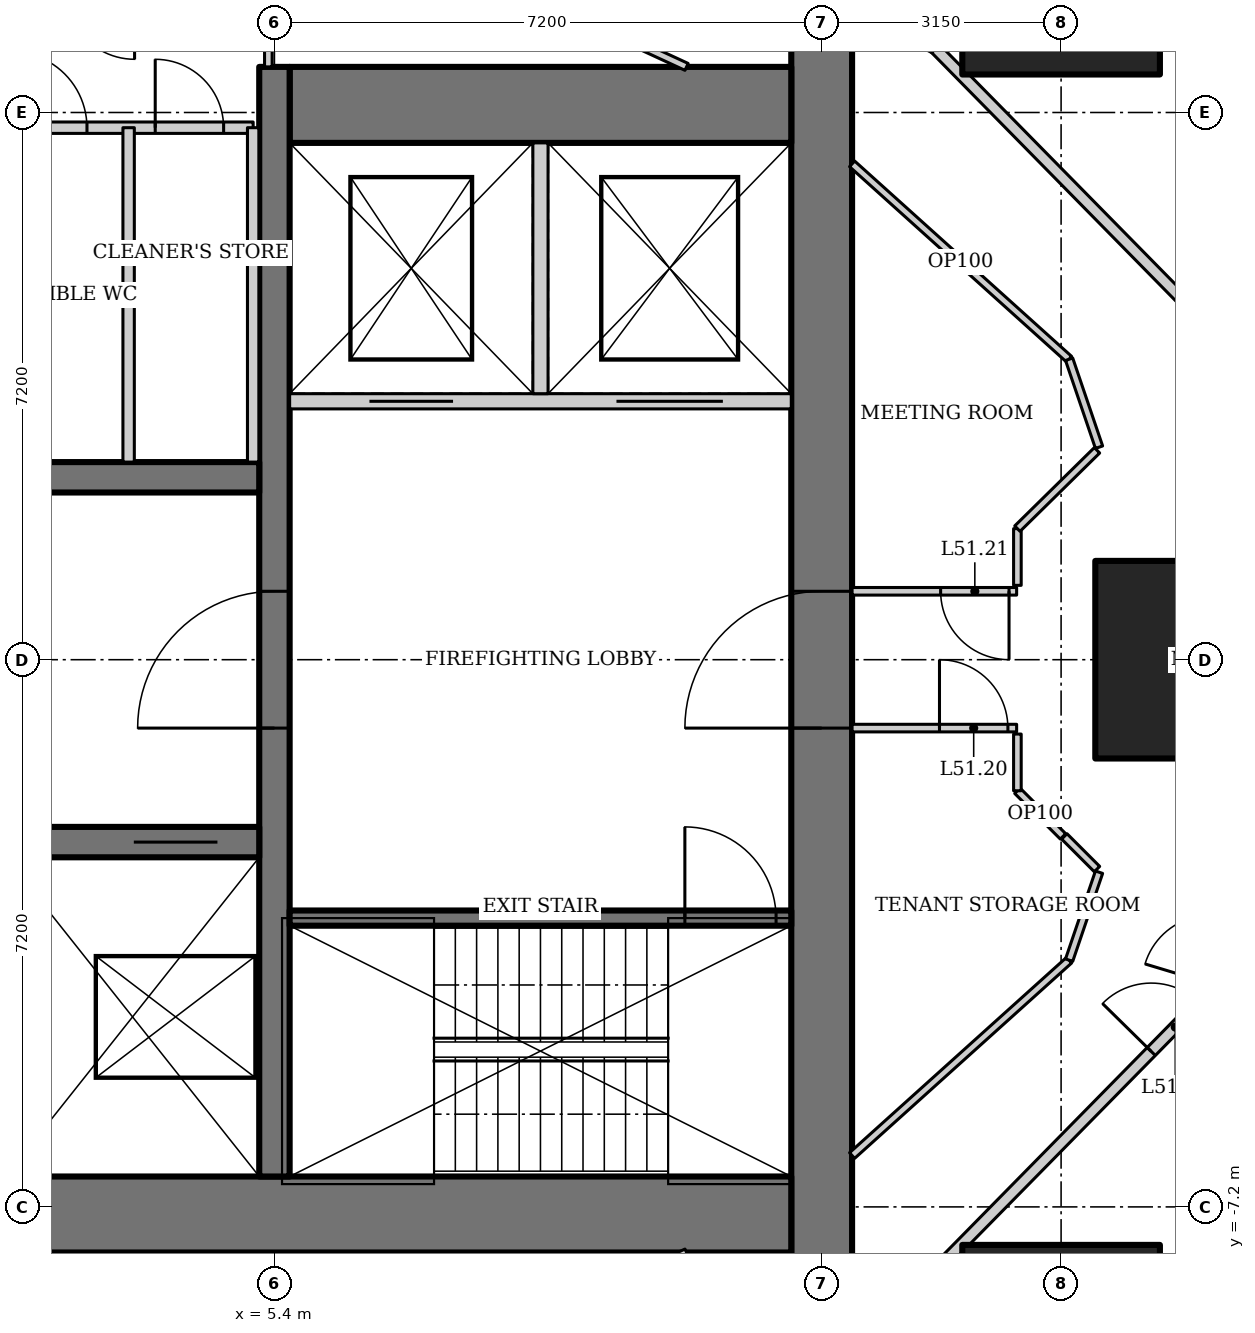
"""IFC4 building model, lengths in metres.
Left out: names, types, materials, properties, quantities, classifications, styles, units other than length and angle.
Written with IfcOpenShell. Run it as: python <this file> out.ifc"""

import sys

from ifc_helpers import new_model, si_unit, direction, frame, frame_2d, origin, origin_2d, place, context, subcontext, project, spatial, rectangle, hollow_rectangle, extrude, element, fill, save


model = new_model("IFC4")
c1 = context("Model", 3, precision=1e-05, world=origin(), true_north=direction((0.0, 1.0)))
c2 = subcontext(c1, "Body", "Model", "MODEL_VIEW")
j1 = project(units=[si_unit("LENGTHUNIT", "METRE"), si_unit("PLANEANGLEUNIT", "RADIAN")], contexts=[c1])
p1 = place(None, origin())
s1 = spatial("IfcSite", under=j1, at=p1, CompositionType="ELEMENT")
p2 = place(p1, origin())
s2 = spatial("IfcBuilding", under=s1, at=p2, CompositionType="ELEMENT")
p3 = place(p2, frame((0.0, 0.0, 220.0)))
s3 = spatial("IfcBuildingStorey", under=s2, at=p3, CompositionType="ELEMENT", Elevation=220.0)
for number, where, z_axis, x_axis in (
    (1, (17.5, 0.0, 0.0), (0.0, 0.0, 1.0), (1.0, 0.0, 0.0)),
    (2, (15.75, 9.0, 0.0), (0.0, 0.0, 1.0), (1.0, 0.0, 0.0)),
    (3, (15.75, -9.0, 0.0), (0.0, 0.0, 1.0), (1.0, 0.0, 0.0)),
):
    element("IfcColumn", number, at=place(p3, frame(where, z_axis=z_axis, x_axis=x_axis)), inside=s3, PredefinedType="COLUMN", context=c2, shape_type="SweptSolid", body=[
        extrude(hollow_rectangle(XDim=2.6, YDim=2.6, WallThickness=0.13, at=origin_2d()), origin(), (0.0, 0.0, 1.0), 4.2),
    ])
p4 = place(p3, frame((12.6, -13.0, 0.0), z_axis=(0.0, 0.0, 1.0), x_axis=(0.0, 1.0, 0.0)))
e4 = element("IfcWall", 4, at=p4, inside=s3, PredefinedType="SHEAR", context=c2, shape_type="SweptSolid", body=[
    extrude(rectangle(XDim=26.0, YDim=0.8, at=frame_2d((13.0, 0.0))), origin(), (0.0, 0.0, 1.0), 4.2),
])
p5 = place(p4, frame((12.1, 0.0, 0.0)))
e5 = element("IfcOpeningElement", 5, at=p5, cuts=e4, PredefinedType="OPENING", context=c2, shape_type="SweptSolid", body=[
    extrude(rectangle(XDim=1.8, YDim=2.1, at=frame_2d((0.9, 1.05))), frame((0.0, 0.41, 0.0), z_axis=(0.0, -1.0, 0.0), x_axis=(1.0, 0.0, 0.0)), (0.0, 0.0, 1.0), 0.82),
])
p6 = place(p3, frame((-12.2, -7.3, 0.0), z_axis=(0.0, 0.0, 1.0), x_axis=(1.0, 0.0, 0.0)))
e6 = element("IfcWall", 6, at=p6, inside=s3, PredefinedType="SHEAR", context=c2, shape_type="SweptSolid", body=[
    extrude(rectangle(XDim=24.4, YDim=1.0, at=frame_2d((12.2, 0.0))), origin(), (0.0, 0.0, 1.0), 4.2),
])
p7 = place(p3, frame((12.2, 7.3, 0.0), z_axis=(0.0, 0.0, 1.0), x_axis=(-1.0, 0.0, 0.0)))
e7 = element("IfcWall", 7, at=p7, inside=s3, PredefinedType="SHEAR", context=c2, shape_type="SweptSolid", body=[
    extrude(rectangle(XDim=6.6, YDim=1.0, at=frame_2d((3.3, 0.0))), origin(), (0.0, 0.0, 1.0), 4.2),
])
p8 = place(p3, frame((5.4, -6.8, 0.0), z_axis=(0.0, 0.0, 1.0), x_axis=(0.0, 1.0, 0.0)))
e8 = element("IfcWall", 8, at=p8, inside=s3, PredefinedType="SHEAR", context=c2, shape_type="SweptSolid", body=[
    extrude(rectangle(XDim=14.6, YDim=0.4, at=frame_2d((7.3, 0.0))), origin(), (0.0, 0.0, 1.0), 4.2),
])
p9 = place(p8, frame((5.9, 0.0, 0.0)))
e9 = element("IfcOpeningElement", 9, at=p9, cuts=e8, PredefinedType="OPENING", context=c2, shape_type="SweptSolid", body=[
    extrude(rectangle(XDim=1.8, YDim=2.1, at=frame_2d((0.9, 1.05))), frame((0.0, 0.21, 0.0), z_axis=(0.0, -1.0, 0.0), x_axis=(1.0, 0.0, 0.0)), (0.0, 0.0, 1.0), 0.42),
])
p10 = place(p3, frame((-5.2, -2.4, 0.0), z_axis=(0.0, 0.0, 1.0), x_axis=(1.0, 0.0, 0.0)))
e10 = element("IfcWall", 10, at=p10, inside=s3, PredefinedType="SHEAR", context=c2, shape_type="SweptSolid", body=[
    extrude(rectangle(XDim=10.4, YDim=0.4, at=frame_2d((5.2, 0.0))), origin(), (0.0, 0.0, 1.0), 4.2),
])
p11 = place(p10, frame((1.683, 0.0, 0.0)))
e11 = element("IfcOpeningElement", 11, at=p11, cuts=e10, PredefinedType="OPENING", context=c2, shape_type="SweptSolid", body=[
    extrude(rectangle(XDim=1.1, YDim=2.2, at=frame_2d((0.55, 1.1))), frame((0.0, 0.21, 0.0), z_axis=(0.0, -1.0, 0.0), x_axis=(1.0, 0.0, 0.0)), (0.0, 0.0, 1.0), 0.42),
])
p12 = place(p10, frame((5.217, 0.0, 0.0)))
e12 = element("IfcOpeningElement", 12, at=p12, cuts=e10, PredefinedType="OPENING", context=c2, shape_type="SweptSolid", body=[
    extrude(rectangle(XDim=1.1, YDim=2.2, at=frame_2d((0.55, 1.1))), frame((0.0, 0.21, 0.0), z_axis=(0.0, -1.0, 0.0), x_axis=(1.0, 0.0, 0.0)), (0.0, 0.0, 1.0), 0.42),
])
p13 = place(p10, frame((8.75, 0.0, 0.0)))
e13 = element("IfcOpeningElement", 13, at=p13, cuts=e10, PredefinedType="OPENING", context=c2, shape_type="SweptSolid", body=[
    extrude(rectangle(XDim=1.1, YDim=2.2, at=frame_2d((0.55, 1.1))), frame((0.0, 0.21, 0.0), z_axis=(0.0, -1.0, 0.0), x_axis=(1.0, 0.0, 0.0)), (0.0, 0.0, 1.0), 0.42),
])
p14 = place(p3, frame((5.2, 2.4, 0.0), z_axis=(0.0, 0.0, 1.0), x_axis=(-1.0, 0.0, 0.0)))
e14 = element("IfcWall", 14, at=p14, inside=s3, PredefinedType="SHEAR", context=c2, shape_type="SweptSolid", body=[
    extrude(rectangle(XDim=10.4, YDim=0.4, at=frame_2d((5.2, 0.0))), origin(), (0.0, 0.0, 1.0), 4.2),
])
p15 = place(p3, frame((5.6, -3.4, 0.0), z_axis=(0.0, 0.0, 1.0), x_axis=(1.0, 0.0, 0.0)))
e15 = element("IfcWall", 15, at=p15, inside=s3, PredefinedType="SHEAR", context=c2, shape_type="SweptSolid", body=[
    extrude(rectangle(XDim=6.6, YDim=0.2, at=frame_2d((3.3, 0.0))), origin(), (0.0, 0.0, 1.0), 4.2),
])
p16 = place(p15, frame((5.2, 0.0, 0.0)))
e16 = element("IfcOpeningElement", 16, at=p16, cuts=e15, PredefinedType="OPENING", context=c2, shape_type="SweptSolid", body=[
    extrude(rectangle(XDim=1.2, YDim=2.1, at=frame_2d((0.6, 1.05))), frame((0.0, 0.11, 0.0), z_axis=(0.0, -1.0, 0.0), x_axis=(1.0, 0.0, 0.0)), (0.0, 0.0, 1.0), 0.22),
])
p17 = place(p3, frame((12.2, 3.4, 0.0), z_axis=(0.0, 0.0, 1.0), x_axis=(-1.0, 0.0, 0.0)))
e17 = element("IfcWall", 17, at=p17, inside=s3, PredefinedType="SOLIDWALL", context=c2, shape_type="SweptSolid", body=[
    extrude(rectangle(XDim=6.6, YDim=0.2, at=frame_2d((3.3, 0.0))), origin(), (0.0, 0.0, 1.0), 4.2),
])
p18 = place(p17, frame((4.45, 0.0, 0.0)))
e18 = element("IfcOpeningElement", 18, at=p18, cuts=e17, PredefinedType="OPENING", context=c2, shape_type="SweptSolid", body=[
    extrude(rectangle(XDim=1.1, YDim=2.2, at=frame_2d((0.55, 1.1))), frame((0.0, 0.11, 0.0), z_axis=(0.0, -1.0, 0.0), x_axis=(1.0, 0.0, 0.0)), (0.0, 0.0, 1.0), 0.22),
])
p19 = place(p17, frame((0.9, 0.0, 0.0)))
e19 = element("IfcOpeningElement", 19, at=p19, cuts=e17, PredefinedType="OPENING", context=c2, shape_type="SweptSolid", body=[
    extrude(rectangle(XDim=1.4, YDim=2.2, at=frame_2d((0.7, 1.1))), frame((0.0, 0.11, 0.0), z_axis=(0.0, -1.0, 0.0), x_axis=(1.0, 0.0, 0.0)), (0.0, 0.0, 1.0), 0.22),
])
p20 = place(p3, frame((8.9, 3.5, 0.0), z_axis=(0.0, 0.0, 1.0), x_axis=(0.0, 1.0, 0.0)))
e20 = element("IfcWall", 20, at=p20, inside=s3, PredefinedType="SOLIDWALL", context=c2, shape_type="SweptSolid", body=[
    extrude(rectangle(XDim=3.3, YDim=0.2, at=frame_2d((1.65, 0.0))), origin(), (0.0, 0.0, 1.0), 4.2),
])
p21 = place(p3, frame((17.673, 4.406, 0.0), z_axis=(0.0, 0.0, 1.0), x_axis=(-0.701111216625, 0.713051934941, 0.0)))
e21 = element("IfcWall", 21, at=p21, inside=s3, PredefinedType="PARTITIONING", context=c2, shape_type="SweptSolid", body=[
    extrude(rectangle(XDim=5.112, YDim=0.15, at=frame_2d((2.556, 0.0))), origin(), (0.0, 0.0, 1.0), 4.05),
])
p22 = place(p3, frame((14.089, 8.051, 0.0), z_axis=(0.0, 0.0, 1.0), x_axis=(-0.886174439647, 0.463351769735, 0.0)))
e22 = element("IfcWall", 22, at=p22, inside=s3, PredefinedType="PARTITIONING", context=c2, shape_type="SweptSolid", body=[
    extrude(rectangle(XDim=4.735, YDim=0.15, at=frame_2d((2.367, 0.0))), origin(), (0.0, 0.0, 1.0), 4.05),
])
p23 = place(p3, frame((14.089, -8.051, 0.0), z_axis=(0.0, 0.0, 1.0), x_axis=(0.701111216625, 0.713051934941, 0.0)))
e23 = element("IfcWall", 23, at=p23, inside=s3, PredefinedType="PARTITIONING", context=c2, shape_type="SweptSolid", body=[
    extrude(rectangle(XDim=5.112, YDim=0.15, at=frame_2d((2.556, 0.0))), origin(), (0.0, 0.0, 1.0), 4.05),
])
p24 = place(p23, frame((4.061, 0.0, 0.0)))
e24 = element("IfcOpeningElement", 24, at=p24, cuts=e23, PredefinedType="OPENING", context=c2, shape_type="SweptSolid", body=[
    extrude(rectangle(XDim=0.9, YDim=2.1, at=frame_2d((0.45, 1.05))), frame((0.0, 0.085, 0.0), z_axis=(0.0, -1.0, 0.0), x_axis=(1.0, 0.0, 0.0)), (0.0, 0.0, 1.0), 0.17),
])
p25 = place(p3, frame((-5.12, 7.0, 0.0), z_axis=(0.0, 0.0, 1.0), x_axis=(1.0, 0.0, 0.0)))
e25 = element("IfcWall", 25, at=p25, inside=s3, PredefinedType="SOLIDWALL", context=c2, shape_type="SweptSolid", body=[
    extrude(rectangle(XDim=10.24, YDim=0.15, at=frame_2d((5.12, 0.0))), origin(), (0.0, 0.0, 1.0), 4.05),
])
p26 = place(p25, frame((1.2, 0.0, 0.0)))
e26 = element("IfcOpeningElement", 26, at=p26, cuts=e25, PredefinedType="OPENING", context=c2, shape_type="SweptSolid", body=[
    extrude(rectangle(XDim=0.9, YDim=2.1, at=frame_2d((0.45, 1.05))), frame((0.0, 0.085, 0.0), z_axis=(0.0, -1.0, 0.0), x_axis=(1.0, 0.0, 0.0)), (0.0, 0.0, 1.0), 0.17),
])
p27 = place(p25, frame((4.477, 0.0, 0.0)))
e27 = element("IfcOpeningElement", 27, at=p27, cuts=e25, PredefinedType="OPENING", context=c2, shape_type="SweptSolid", body=[
    extrude(rectangle(XDim=0.9, YDim=2.1, at=frame_2d((0.45, 1.05))), frame((0.0, 0.085, 0.0), z_axis=(0.0, -1.0, 0.0), x_axis=(1.0, 0.0, 0.0)), (0.0, 0.0, 1.0), 0.17),
])
p28 = place(p25, frame((7.054, 0.0, 0.0)))
e28 = element("IfcOpeningElement", 28, at=p28, cuts=e25, PredefinedType="OPENING", context=c2, shape_type="SweptSolid", body=[
    extrude(rectangle(XDim=1.0, YDim=2.1, at=frame_2d((0.5, 1.05))), frame((0.0, 0.085, 0.0), z_axis=(0.0, -1.0, 0.0), x_axis=(1.0, 0.0, 0.0)), (0.0, 0.0, 1.0), 0.17),
])
p29 = place(p25, frame((8.952, 0.0, 0.0)))
e29 = element("IfcOpeningElement", 29, at=p29, cuts=e25, PredefinedType="OPENING", context=c2, shape_type="SweptSolid", body=[
    extrude(rectangle(XDim=0.9, YDim=2.1, at=frame_2d((0.45, 1.05))), frame((0.0, 0.085, 0.0), z_axis=(0.0, -1.0, 0.0), x_axis=(1.0, 0.0, 0.0)), (0.0, 0.0, 1.0), 0.17),
])
for number, where, z_axis, x_axis in (
    (30, (5.12, 2.6, 0.0), (0.0, 0.0, 1.0), (0.0, 1.0, 0.0)),
    (31, (3.482, 2.6, 0.0), (0.0, 0.0, 1.0), (0.0, 1.0, 0.0)),
):
    element("IfcWall", number, at=place(p3, frame(where, z_axis=z_axis, x_axis=x_axis)), inside=s3, PredefinedType="SOLIDWALL", context=c2, shape_type="SweptSolid", body=[
        extrude(rectangle(XDim=4.4, YDim=0.15, at=frame_2d((2.2, 0.0))), origin(), (0.0, 0.0, 1.0), 4.05),
    ])
p30 = place(p3, frame((10.823, -7.8, 0.0), z_axis=(0.0, 0.0, 1.0), x_axis=(-0.907759689292, -0.419490579748, 0.0)))
e32 = element("IfcWall", 32, at=p30, inside=s3, PredefinedType="PARTITIONING", context=c2, shape_type="SweptSolid", body=[
    extrude(rectangle(XDim=2.506, YDim=0.1, at=frame_2d((1.253, 0.0))), origin(), (0.0, 0.0, 1.0), 4.05),
])
for number, where, z_axis, x_axis in (
    (33, (15.856, -3.953, 0.0), (0.0, 0.0, 1.0), (-0.743, -0.669, 0.0)),
    (34, (13.0, 6.524, 0.0), (0.0, 0.0, 1.0), (0.743, -0.669, 0.0)),
):
    element("IfcWall", number, at=place(p3, frame(where, z_axis=z_axis, x_axis=x_axis)), inside=s3, PredefinedType="PARTITIONING", context=c2, shape_type="SweptSolid", body=[
        extrude(rectangle(XDim=3.843, YDim=0.1, at=frame_2d((1.921, 0.0))), origin(), (0.0, 0.0, 1.0), 4.05),
    ])
p31 = place(p3, frame((5.32, 7.8, 0.0), z_axis=(0.0, 0.0, 1.0), x_axis=(0.0, 1.0, 0.0)))
e35 = element("IfcWall", 35, at=p31, inside=s3, PredefinedType="PARTITIONING", context=c2, shape_type="SweptSolid", body=[
    extrude(rectangle(XDim=1.0, YDim=0.1, at=frame_2d((0.5, 0.0))), origin(), (0.0, 0.0, 1.0), 4.05),
])
p32 = place(p3, frame((8.548, 8.851, 0.0), z_axis=(0.0, 0.0, 1.0), x_axis=(0.907759689292, -0.419490579748, 0.0)))
e36 = element("IfcWall", 36, at=p32, inside=s3, PredefinedType="PARTITIONING", context=c2, shape_type="SweptSolid", body=[
    extrude(rectangle(XDim=2.506, YDim=0.1, at=frame_2d((1.253, 0.0))), origin(), (0.0, 0.0, 1.0), 4.05),
])
p33 = place(p3, frame((13.0, -0.9, 0.0), z_axis=(0.0, 0.0, 1.0), x_axis=(1.0, 0.0, 0.0)))
e37 = element("IfcWall", 37, at=p33, inside=s3, PredefinedType="PARTITIONING", context=c2, shape_type="SweptSolid", body=[
    extrude(rectangle(XDim=2.165, YDim=0.1, at=frame_2d((1.083, 0.0))), origin(), (0.0, 0.0, 1.0), 4.05),
])
p34 = place(p33, frame((1.15, 0.0, 0.0)))
e38 = element("IfcOpeningElement", 38, at=p34, cuts=e37, PredefinedType="OPENING", context=c2, shape_type="SweptSolid", body=[
    extrude(rectangle(XDim=0.9, YDim=2.1, at=frame_2d((0.45, 1.05))), frame((0.0, 0.06, 0.0), z_axis=(0.0, -1.0, 0.0), x_axis=(1.0, 0.0, 0.0)), (0.0, 0.0, 1.0), 0.12),
])
for number, where, z_axis, x_axis in (
    (39, (16.249, -2.796, 0.0), (0.0, 0.0, 1.0), (-0.322, -0.947, 0.0)),
    (40, (15.856, 3.953, 0.0), (0.0, 0.0, 1.0), (0.322, -0.947, 0.0)),
):
    element("IfcWall", number, at=place(p3, frame(where, z_axis=z_axis, x_axis=x_axis)), inside=s3, PredefinedType="PARTITIONING", context=c2, shape_type="SweptSolid", body=[
        extrude(rectangle(XDim=1.223, YDim=0.1, at=frame_2d((0.611, 0.0))), origin(), (0.0, 0.0, 1.0), 4.05),
    ])
p35 = place(p3, frame((15.165, 0.9, 0.0), z_axis=(0.0, 0.0, 1.0), x_axis=(-1.0, 0.0, 0.0)))
e41 = element("IfcWall", 41, at=p35, inside=s3, PredefinedType="PARTITIONING", context=c2, shape_type="SweptSolid", body=[
    extrude(rectangle(XDim=2.165, YDim=0.1, at=frame_2d((1.083, 0.0))), origin(), (0.0, 0.0, 1.0), 4.05),
])
p36 = place(p35, frame((0.1, 0.0, 0.0)))
e42 = element("IfcOpeningElement", 42, at=p36, cuts=e41, PredefinedType="OPENING", context=c2, shape_type="SweptSolid", body=[
    extrude(rectangle(XDim=0.9, YDim=2.1, at=frame_2d((0.45, 1.05))), frame((0.0, 0.06, 0.0), z_axis=(0.0, -1.0, 0.0), x_axis=(1.0, 0.0, 0.0)), (0.0, 0.0, 1.0), 0.12),
])
p37 = place(p3, frame((15.775, -2.325, 0.0), z_axis=(0.0, 0.0, 1.0), x_axis=(-0.707106781187, 0.707106781187, 0.0)))
e43 = element("IfcWall", 43, at=p37, inside=s3, PredefinedType="PARTITIONING", context=c2, shape_type="SweptSolid", body=[
    extrude(rectangle(XDim=0.849, YDim=0.1, at=frame_2d((0.425, 0.0))), origin(), (0.0, 0.0, 1.0), 4.05),
])
p38 = place(p3, frame((15.175, -1.725, 0.0), z_axis=(0.0, 0.0, 1.0), x_axis=(0.0, 1.0, 0.0)))
e44 = element("IfcWall", 44, at=p38, inside=s3, PredefinedType="PARTITIONING", context=c2, shape_type="SweptSolid", body=[
    extrude(rectangle(XDim=0.746, YDim=0.1, at=frame_2d((0.373, 0.0))), origin(), (0.0, 0.0, 1.0), 4.05),
])
p39 = place(p3, frame((16.223, -2.755, 0.0), z_axis=(0.0, 0.0, 1.0), x_axis=(-0.707106781187, 0.707106781187, 0.0)))
e45 = element("IfcWall", 45, at=p39, inside=s3, PredefinedType="PARTITIONING", context=c2, shape_type="SweptSolid", body=[
    extrude(rectangle(XDim=0.608, YDim=0.1, at=frame_2d((0.304, 0.0))), origin(), (0.0, 0.0, 1.0), 4.05),
])
p40 = place(p3, frame((15.175, 0.978, 0.0), z_axis=(0.0, 0.0, 1.0), x_axis=(0.0, 1.0, 0.0)))
e46 = element("IfcWall", 46, at=p40, inside=s3, PredefinedType="PARTITIONING", context=c2, shape_type="SweptSolid", body=[
    extrude(rectangle(XDim=0.746, YDim=0.1, at=frame_2d((0.373, 0.0))), origin(), (0.0, 0.0, 1.0), 4.05),
])
p41 = place(p3, frame((15.175, 1.725, 0.0), z_axis=(0.0, 0.0, 1.0), x_axis=(0.712897698193, 0.701268045694, 0.0)))
e47 = element("IfcWall", 47, at=p41, inside=s3, PredefinedType="PARTITIONING", context=c2, shape_type="SweptSolid", body=[
    extrude(rectangle(XDim=1.469, YDim=0.1, at=frame_2d((0.735, 0.0))), origin(), (0.0, 0.0, 1.0), 4.05),
])
p42 = place(p9, origin())
e48 = element("IfcDoor", 48, at=p42, inside=s3, OperationType="DOUBLE_DOOR_DOUBLE_SWING", PredefinedType="DOOR", context=c2, shape_type="SweptSolid", body=[
    extrude(rectangle(XDim=1.8, YDim=2.1, at=frame_2d((0.9, 1.05))), frame((0.0, 0.025, 0.0), z_axis=(0.0, -1.0, 0.0), x_axis=(1.0, 0.0, 0.0)), (0.0, 0.0, 1.0), 0.05),
])
fill(e9, e48)
p43 = place(p16, origin())
e49 = element("IfcDoor", 49, at=p43, inside=s3, OperationType="SINGLE_SWING_RIGHT", PredefinedType="DOOR", context=c2, shape_type="SweptSolid", body=[
    extrude(rectangle(XDim=1.2, YDim=2.1, at=frame_2d((0.6, 1.05))), frame((0.0, 0.025, 0.0), z_axis=(0.0, -1.0, 0.0), x_axis=(1.0, 0.0, 0.0)), (0.0, 0.0, 1.0), 0.05),
])
fill(e16, e49)
p44 = place(p5, origin())
e50 = element("IfcDoor", 50, at=p44, inside=s3, OperationType="DOUBLE_DOOR_DOUBLE_SWING", PredefinedType="DOOR", context=c2, shape_type="SweptSolid", body=[
    extrude(rectangle(XDim=1.8, YDim=2.1, at=frame_2d((0.9, 1.05))), frame((0.0, 0.025, 0.0), z_axis=(0.0, -1.0, 0.0), x_axis=(1.0, 0.0, 0.0)), (0.0, 0.0, 1.0), 0.05),
])
fill(e5, e50)
p45 = place(p13, origin())
e51 = element("IfcDoor", 51, at=p45, inside=s3, OperationType="DOUBLE_DOOR_SLIDING", PredefinedType="DOOR", context=c2, shape_type="SweptSolid", body=[
    extrude(rectangle(XDim=1.1, YDim=2.2, at=frame_2d((0.55, 1.1))), frame((0.0, 0.025, 0.0), z_axis=(0.0, -1.0, 0.0), x_axis=(1.0, 0.0, 0.0)), (0.0, 0.0, 1.0), 0.05),
])
fill(e13, e51)
p46 = place(p18, origin())
e52 = element("IfcDoor", 52, at=p46, inside=s3, OperationType="DOUBLE_DOOR_SLIDING", PredefinedType="DOOR", context=c2, shape_type="SweptSolid", body=[
    extrude(rectangle(XDim=1.1, YDim=2.2, at=frame_2d((0.55, 1.1))), frame((0.0, 0.025, 0.0), z_axis=(0.0, -1.0, 0.0), x_axis=(1.0, 0.0, 0.0)), (0.0, 0.0, 1.0), 0.05),
])
fill(e18, e52)
p47 = place(p19, origin())
e53 = element("IfcDoor", 53, at=p47, inside=s3, OperationType="DOUBLE_DOOR_SLIDING", PredefinedType="DOOR", context=c2, shape_type="SweptSolid", body=[
    extrude(rectangle(XDim=1.4, YDim=2.2, at=frame_2d((0.7, 1.1))), frame((0.0, 0.025, 0.0), z_axis=(0.0, -1.0, 0.0), x_axis=(1.0, 0.0, 0.0)), (0.0, 0.0, 1.0), 0.05),
])
fill(e19, e53)
p48 = place(p28, origin())
e54 = element("IfcDoor", 54, at=p48, inside=s3, OperationType="SINGLE_SWING_LEFT", PredefinedType="DOOR", context=c2, shape_type="SweptSolid", body=[
    extrude(rectangle(XDim=1.0, YDim=2.1, at=frame_2d((0.5, 1.05))), frame((0.0, 0.025, 0.0), z_axis=(0.0, -1.0, 0.0), x_axis=(1.0, 0.0, 0.0)), (0.0, 0.0, 1.0), 0.05),
])
fill(e28, e54)
p49 = place(p29, origin())
e55 = element("IfcDoor", 55, at=p49, inside=s3, OperationType="SINGLE_SWING_LEFT", PredefinedType="DOOR", context=c2, shape_type="SweptSolid", body=[
    extrude(rectangle(XDim=0.9, YDim=2.1, at=frame_2d((0.45, 1.05))), frame((0.0, 0.025, 0.0), z_axis=(0.0, -1.0, 0.0), x_axis=(1.0, 0.0, 0.0)), (0.0, 0.0, 1.0), 0.05),
])
fill(e29, e55)
p50 = place(p34, origin())
e56 = element("IfcDoor", 56, at=p50, inside=s3, OperationType="SINGLE_SWING_LEFT", PredefinedType="DOOR", context=c2, shape_type="SweptSolid", body=[
    extrude(rectangle(XDim=0.9, YDim=2.1, at=frame_2d((0.45, 1.05))), frame((0.0, 0.025, 0.0), z_axis=(0.0, -1.0, 0.0), x_axis=(1.0, 0.0, 0.0)), (0.0, 0.0, 1.0), 0.05),
])
fill(e38, e56)
p51 = place(p36, origin())
e57 = element("IfcDoor", 57, at=p51, inside=s3, OperationType="SINGLE_SWING_LEFT", PredefinedType="DOOR", context=c2, shape_type="SweptSolid", body=[
    extrude(rectangle(XDim=0.9, YDim=2.1, at=frame_2d((0.45, 1.05))), frame((0.0, 0.025, 0.0), z_axis=(0.0, -1.0, 0.0), x_axis=(1.0, 0.0, 0.0)), (0.0, 0.0, 1.0), 0.05),
])
fill(e42, e57)
p52 = place(p24, origin())
e58 = element("IfcDoor", 58, at=p52, inside=s3, OperationType="SINGLE_SWING_LEFT", PredefinedType="DOOR", context=c2, shape_type="SweptSolid", body=[
    extrude(rectangle(XDim=0.9, YDim=2.1, at=frame_2d((0.45, 1.05))), frame((0.0, 0.025, 0.0), z_axis=(0.0, -1.0, 0.0), x_axis=(1.0, 0.0, 0.0)), (0.0, 0.0, 1.0), 0.05),
])
fill(e24, e58)
save(model, sys.argv[1])
